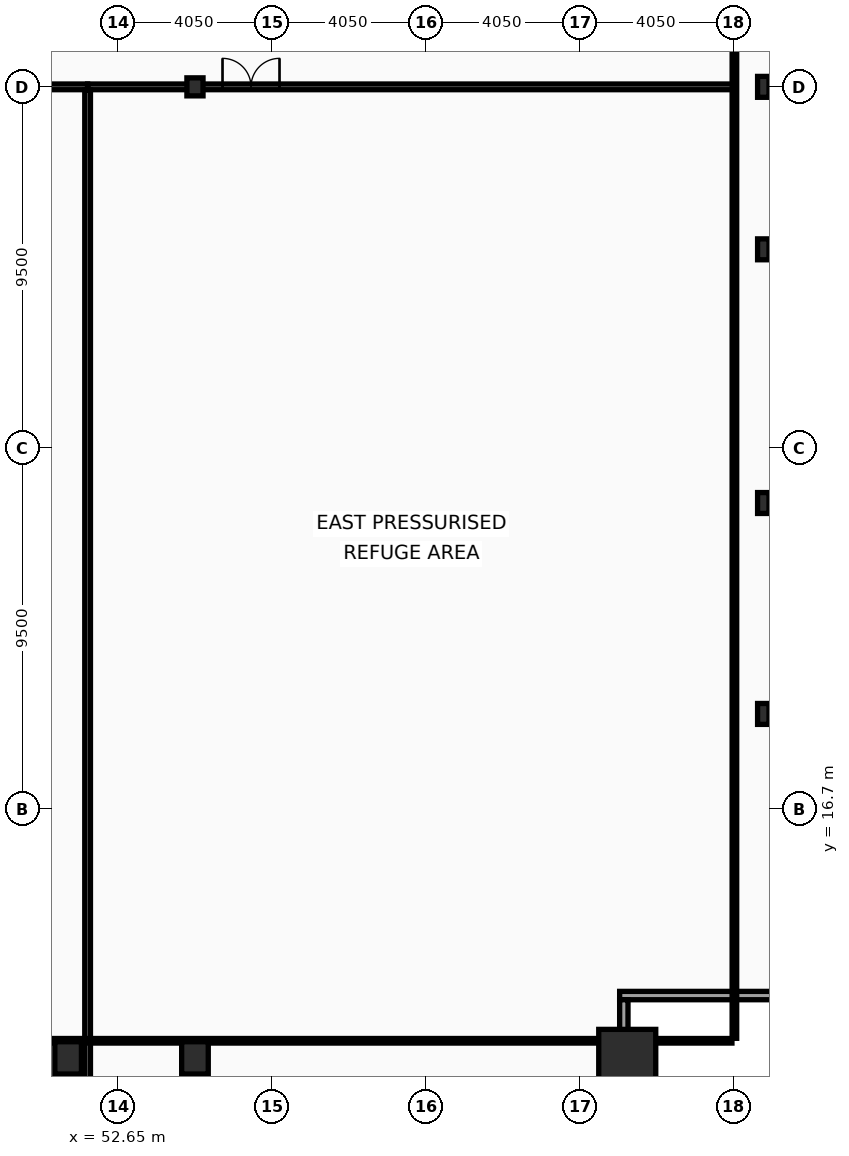
"""IFC4 building model, lengths in metres.
Left out: names, types, materials, properties, quantities, classifications, styles, units other than length and angle.
Written with IfcOpenShell. Run it as: python <this file> out.ifc"""

import sys

from ifc_helpers import new_model, si_unit, direction, frame, frame_2d, origin, origin_2d, place, context, subcontext, project, spatial, rectangle, hollow_rectangle, i_section, extrude, element, fill, save


model = new_model("IFC4")
c1 = context("Model", 3, precision=1e-05, world=origin(), true_north=direction((0.0, 1.0)))
c2 = subcontext(c1, "Body", "Model", "MODEL_VIEW")
j1 = project(units=[si_unit("LENGTHUNIT", "METRE"), si_unit("PLANEANGLEUNIT", "RADIAN")], contexts=[c1])
p1 = place(None, origin())
s1 = spatial("IfcSite", under=j1, at=p1, CompositionType="ELEMENT")
p2 = place(p1, origin())
s2 = spatial("IfcBuilding", under=s1, at=p2, CompositionType="ELEMENT")
p3 = place(p2, frame((0.0, 0.0, 85.8)))
s3 = spatial("IfcBuildingStorey", under=s2, at=p3, CompositionType="ELEMENT", Elevation=85.8)
p4 = place(p3, frame((66.05, 10.15, 0.0), z_axis=(0.0, 0.0, 1.0), x_axis=(1.0, 0.0, 0.0)))
e1 = element("IfcColumn", 1, at=p4, inside=s3, PredefinedType="COLUMN", context=c2, shape_type="SweptSolid", body=[
    extrude(hollow_rectangle(XDim=1.5, YDim=1.5, WallThickness=0.07, at=origin_2d()), origin(), (0.0, 0.0, 1.0), 4.8),
])
for number, where, z_axis, x_axis in (
    (2, (51.337, 10.15, 0.0), (0.0, 0.0, 1.0), (1.0, 0.0, 0.0)),
    (3, (54.675, 10.15, 0.0), (0.0, 0.0, 1.0), (1.0, 0.0, 0.0)),
):
    element("IfcColumn", number, at=place(p3, frame(where, z_axis=z_axis, x_axis=x_axis)), inside=s3, PredefinedType="COLUMN", context=c2, shape_type="SweptSolid", body=[
        extrude(hollow_rectangle(XDim=0.7, YDim=0.85, WallThickness=0.05, at=origin_2d()), origin(), (0.0, 0.0, 1.0), 4.8),
    ])
for number, where, z_axis, x_axis in (
    (4, (69.63, 19.2, 0.0), (0.0, 0.0, 1.0), (1.0, 0.0, 0.0)),
    (5, (69.63, 24.75, 0.0), (0.0, 0.0, 1.0), (1.0, 0.0, 0.0)),
    (6, (69.63, 31.425, 0.0), (0.0, 0.0, 1.0), (1.0, 0.0, 0.0)),
    (7, (69.63, 35.7, 0.0), (0.0, 0.0, 1.0), (1.0, 0.0, 0.0)),
):
    element("IfcColumn", number, at=place(p3, frame(where, z_axis=z_axis, x_axis=x_axis)), inside=s3, PredefinedType="COLUMN", context=c2, shape_type="SweptSolid", body=[
        extrude(i_section(OverallWidth=0.3, OverallDepth=0.55, WebThickness=0.015, FlangeThickness=0.029, at=origin_2d()), origin(), (0.0, 0.0, 1.0), 4.8),
    ])
p5 = place(p3, frame((54.675, 35.7, 0.0), z_axis=(0.0, 0.0, 1.0), x_axis=(1.0, 0.0, 0.0)))
e8 = element("IfcColumn", 8, at=p5, inside=s3, PredefinedType="COLUMN", context=c2, shape_type="SweptSolid", body=[
    extrude(i_section(OverallWidth=0.424, OverallDepth=0.474, WebThickness=0.048, FlangeThickness=0.077, at=origin_2d()), origin(), (0.0, 0.0, 1.0), 4.8),
])
p6 = place(p3, frame((70.07, 11.79, 0.0), z_axis=(0.0, 0.0, 1.0), x_axis=(-1.0, 0.0, 0.0)))
e9 = element("IfcWall", 9, at=p6, inside=s3, PredefinedType="SOLIDWALL", context=c2, shape_type="SweptSolid", body=[
    extrude(rectangle(XDim=4.22, YDim=0.22, at=frame_2d((2.11, 0.0))), origin(), (0.0, 0.0, 1.0), 3.96),
])
p7 = place(p3, frame((65.96, 11.68, 0.0), z_axis=(0.0, 0.0, 1.0), x_axis=(0.0, -1.0, 0.0)))
e10 = element("IfcWall", 10, at=p7, inside=s3, PredefinedType="SOLIDWALL", context=c2, shape_type="SweptSolid", body=[
    extrude(rectangle(XDim=3.91, YDim=0.22, at=frame_2d((1.955, 0.0))), origin(), (0.0, 0.0, 1.0), 3.96),
])
p8 = place(p3, frame((47.45, 35.7, 0.0), z_axis=(0.0, 0.0, 1.0), x_axis=(1.0, 0.0, 0.0)))
e11 = element("IfcWall", 11, at=p8, inside=s3, PredefinedType="PARTITIONING", context=c2, shape_type="SweptSolid", body=[
    extrude(rectangle(XDim=4.4, YDim=0.15, at=frame_2d((2.2, 0.0))), origin(), (0.0, 0.0, 1.0), 3.81),
])
p9 = place(p3, frame((51.85, 35.7, 0.0), z_axis=(0.0, 0.0, 1.0), x_axis=(1.0, 0.0, 0.0)))
e12 = element("IfcWall", 12, at=p9, inside=s3, PredefinedType="PARTITIONING", context=c2, shape_type="SweptSolid", body=[
    extrude(rectangle(XDim=17.02, YDim=0.15, at=frame_2d((8.51, 0.0))), origin(), (0.0, 0.0, 1.0), 3.81),
])
p10 = place(p9, frame((3.55, 0.0, 0.0)))
e13 = element("IfcOpeningElement", 13, at=p10, cuts=e12, PredefinedType="OPENING", context=c2, shape_type="SweptSolid", body=[
    extrude(rectangle(XDim=1.5, YDim=2.15, at=frame_2d((0.75, 1.075))), frame((0.0, 0.085, 0.0), z_axis=(0.0, -1.0, 0.0), x_axis=(1.0, 0.0, 0.0)), (0.0, 0.0, 1.0), 0.17),
])
p11 = place(p3, frame((51.85, 7.82, 0.0), z_axis=(0.0, 0.0, 1.0), x_axis=(0.0, 1.0, 0.0)))
e14 = element("IfcWall", 14, at=p11, inside=s3, PredefinedType="PARTITIONING", context=c2, shape_type="SweptSolid", body=[
    extrude(rectangle(XDim=27.8, YDim=0.15, at=frame_2d((13.9, 0.0))), origin(), (0.0, 0.0, 1.0), 3.81),
])
p12 = place(p3, frame((68.87, 10.665, 0.0), z_axis=(0.0, 0.0, 1.0), x_axis=(0.0, 1.0, 0.0)))
e15 = element("IfcWall", 15, at=p12, inside=s3, PredefinedType="PARTITIONING", context=c2, shape_type="SweptSolid", body=[
    extrude(rectangle(XDim=42.11, YDim=0.12, at=frame_2d((21.055, 0.0))), origin(), (0.0, 0.0, 1.0), 3.81),
])
p13 = place(p3, frame((4.095, 10.6, 0.0), z_axis=(0.0, 0.0, 1.0), x_axis=(1.0, 0.0, 0.0)))
e16 = element("IfcWall", 16, at=p13, inside=s3, PredefinedType="PARTITIONING", context=c2, shape_type="SweptSolid", body=[
    extrude(rectangle(XDim=64.71, YDim=0.12, at=frame_2d((32.355, 0.0))), origin(), (0.0, 0.0, 1.0), 3.81),
])
p14 = place(p10, origin())
e17 = element("IfcDoor", 17, at=p14, inside=s3, OperationType="DOUBLE_DOOR_SINGLE_SWING", PredefinedType="DOOR", context=c2, shape_type="SweptSolid", body=[
    extrude(rectangle(XDim=1.5, YDim=2.15, at=frame_2d((0.75, 1.075))), frame((0.0, 0.025, 0.0), z_axis=(0.0, -1.0, 0.0), x_axis=(1.0, 0.0, 0.0)), (0.0, 0.0, 1.0), 0.05),
])
fill(e13, e17)
save(model, sys.argv[1])
